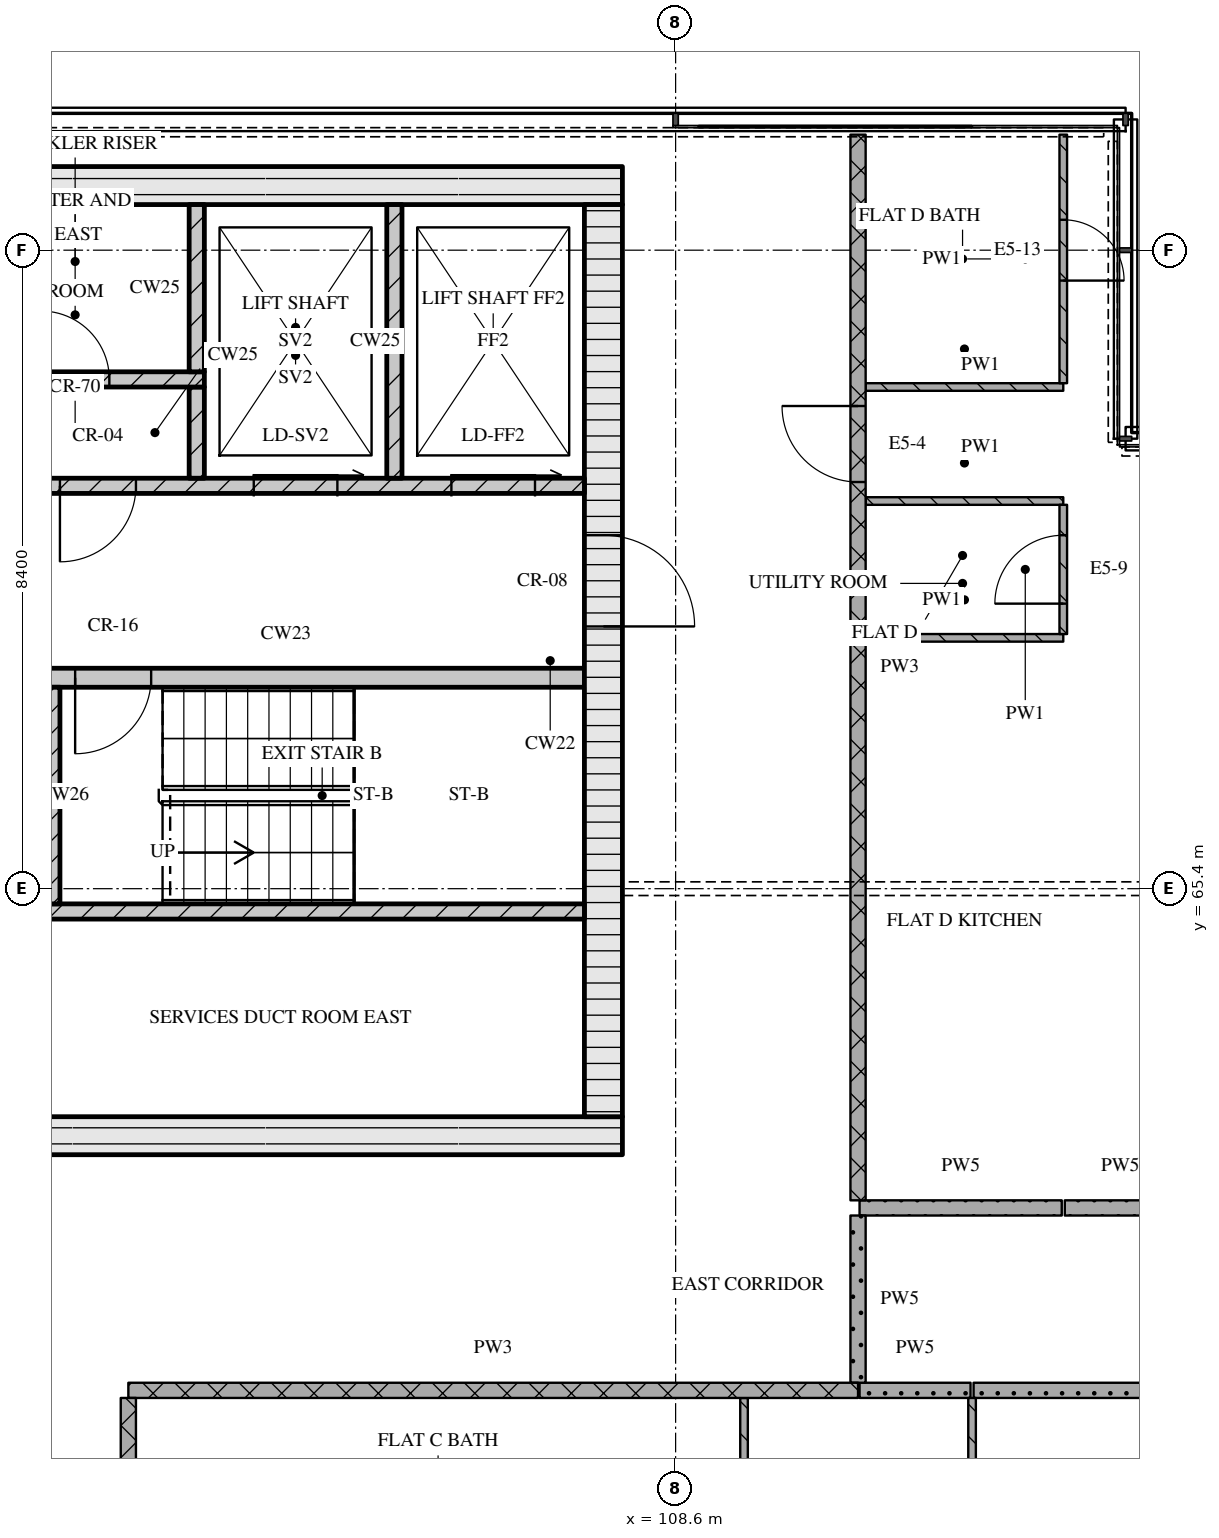
"""IFC4 building model, lengths in metres.
Left out: names, types, materials, properties, quantities, classifications, styles, units other than length and angle.
Written with IfcOpenShell. Run it as: python <this file> out.ifc"""

import sys

from ifc_helpers import new_model, si_unit, direction, frame, frame_2d, origin, place, context, subcontext, project, spatial, rectangle, extrude, element, fill, save


model = new_model("IFC4")
c1 = context("Model", 3, precision=1e-05, world=origin(), true_north=direction((0.0, 1.0)))
c2 = subcontext(c1, "Body", "Model", "MODEL_VIEW")
j1 = project(units=[si_unit("LENGTHUNIT", "METRE"), si_unit("PLANEANGLEUNIT", "RADIAN")], contexts=[c1])
p1 = place(None, origin())
s1 = spatial("IfcSite", under=j1, at=p1, CompositionType="ELEMENT")
p2 = place(p1, origin())
s2 = spatial("IfcBuilding", under=s1, at=p2, CompositionType="ELEMENT")
p3 = place(p2, frame((0.0, 0.0, 288.75)))
s3 = spatial("IfcBuildingStorey", under=s2, at=p3, CompositionType="ELEMENT", Elevation=288.75)
p4 = place(p3, frame((67.3, 62.15, 0.0), z_axis=(0.0, 0.0, 1.0), x_axis=(1.0, 0.0, 0.0)))
e1 = element("IfcWall", 1, at=p4, inside=s3, PredefinedType="SOLIDWALL", context=c2, shape_type="SweptSolid", body=[
    extrude(rectangle(XDim=40.6, YDim=0.5, at=frame_2d((20.3, 0.0))), origin(), (0.0, 0.0, 1.0), 3.32),
])
p5 = place(p4, frame((20.65, 0.0, 0.0)))
e2 = element("IfcOpeningElement", 2, at=p5, cuts=e1, PredefinedType="OPENING", context=c2, shape_type="SweptSolid", body=[
    extrude(rectangle(XDim=1.8, YDim=2.1, at=frame_2d((0.9, 1.05))), frame((0.0, 0.26, 0.0), z_axis=(0.0, -1.0, 0.0), x_axis=(1.0, 0.0, 0.0)), (0.0, 0.0, 1.0), 0.52),
])
p6 = place(p3, frame((67.3, 74.65, 0.0), z_axis=(0.0, 0.0, 1.0), x_axis=(1.0, 0.0, 0.0)))
e3 = element("IfcWall", 3, at=p6, inside=s3, PredefinedType="SOLIDWALL", context=c2, shape_type="SweptSolid", body=[
    extrude(rectangle(XDim=40.6, YDim=0.5, at=frame_2d((20.3, 0.0))), origin(), (0.0, 0.0, 1.0), 3.32),
])
p7 = place(p3, frame((107.65, 62.4, 0.0), z_axis=(0.0, 0.0, 1.0), x_axis=(0.0, 1.0, 0.0)))
e4 = element("IfcWall", 4, at=p7, inside=s3, PredefinedType="SOLIDWALL", context=c2, shape_type="SweptSolid", body=[
    extrude(rectangle(XDim=12.0, YDim=0.5, at=frame_2d((6.0, 0.0))), origin(), (0.0, 0.0, 1.0), 3.32),
])
p8 = place(p7, frame((6.45, 0.0, 0.0)))
e5 = element("IfcOpeningElement", 5, at=p8, cuts=e4, PredefinedType="OPENING", context=c2, shape_type="SweptSolid", body=[
    extrude(rectangle(XDim=1.2, YDim=2.1, at=frame_2d((0.6, 1.05))), frame((0.0, 0.26, 0.0), z_axis=(0.0, -1.0, 0.0), x_axis=(1.0, 0.0, 0.0)), (0.0, 0.0, 1.0), 0.52),
])
p9 = place(p3, frame((91.4, 65.1, 0.0), z_axis=(0.0, 0.0, 1.0), x_axis=(1.0, 0.0, 0.0)))
e6 = element("IfcWall", 6, at=p9, inside=s3, PredefinedType="SOLIDWALL", context=c2, shape_type="SweptSolid", body=[
    extrude(rectangle(XDim=16.0, YDim=0.2, at=frame_2d((8.0, 0.0))), origin(), (0.0, 0.0, 1.0), 3.32),
])
p10 = place(p9, frame((0.85, 0.0, 0.0)))
e7 = element("IfcOpeningElement", 7, at=p10, cuts=e6, PredefinedType="OPENING", context=c2, shape_type="SweptSolid", body=[
    extrude(rectangle(XDim=1.1, YDim=2.1, at=frame_2d((0.55, 1.05))), frame((0.0, 0.11, 0.0), z_axis=(0.0, -1.0, 0.0), x_axis=(1.0, 0.0, 0.0)), (0.0, 0.0, 1.0), 0.22),
])
p11 = place(p9, frame((3.35, 0.0, 0.0)))
e8 = element("IfcOpeningElement", 8, at=p11, cuts=e6, PredefinedType="OPENING", context=c2, shape_type="SweptSolid", body=[
    extrude(rectangle(XDim=1.1, YDim=2.1, at=frame_2d((0.55, 1.05))), frame((0.0, 0.11, 0.0), z_axis=(0.0, -1.0, 0.0), x_axis=(1.0, 0.0, 0.0)), (0.0, 0.0, 1.0), 0.22),
])
p12 = place(p9, frame((5.85, 0.0, 0.0)))
e9 = element("IfcOpeningElement", 9, at=p12, cuts=e6, PredefinedType="OPENING", context=c2, shape_type="SweptSolid", body=[
    extrude(rectangle(XDim=1.1, YDim=2.1, at=frame_2d((0.55, 1.05))), frame((0.0, 0.11, 0.0), z_axis=(0.0, -1.0, 0.0), x_axis=(1.0, 0.0, 0.0)), (0.0, 0.0, 1.0), 0.22),
])
p13 = place(p9, frame((7.83, 0.0, 0.0)))
e10 = element("IfcOpeningElement", 10, at=p13, cuts=e6, PredefinedType="OPENING", context=c2, shape_type="SweptSolid", body=[
    extrude(rectangle(XDim=0.9, YDim=2.1, at=frame_2d((0.45, 1.05))), frame((0.0, 0.11, 0.0), z_axis=(0.0, -1.0, 0.0), x_axis=(1.0, 0.0, 0.0)), (0.0, 0.0, 1.0), 0.22),
])
p14 = place(p3, frame((100.35, 65.2, 0.0), z_axis=(0.0, 0.0, 1.0), x_axis=(0.0, 1.0, 0.0)))
e11 = element("IfcWall", 11, at=p14, inside=s3, PredefinedType="SOLIDWALL", context=c2, shape_type="SweptSolid", body=[
    extrude(rectangle(XDim=2.85, YDim=0.3, at=frame_2d((1.425, 0.0))), origin(), (0.0, 0.0, 1.0), 3.32),
])
p15 = place(p3, frame((98.95, 68.175, 0.0), z_axis=(0.0, 0.0, 1.0), x_axis=(1.0, 0.0, 0.0)))
e12 = element("IfcWall", 12, at=p15, inside=s3, PredefinedType="SOLIDWALL", context=c2, shape_type="SweptSolid", body=[
    extrude(rectangle(XDim=8.45, YDim=0.25, at=frame_2d((4.225, 0.0))), origin(), (0.0, 0.0, 1.0), 3.32),
])
p16 = place(p15, frame((0.45, 0.0, 0.0)))
e13 = element("IfcOpeningElement", 13, at=p16, cuts=e12, PredefinedType="OPENING", context=c2, shape_type="SweptSolid", body=[
    extrude(rectangle(XDim=0.8, YDim=2.1, at=frame_2d((0.4, 1.05))), frame((0.0, 0.135, 0.0), z_axis=(0.0, -1.0, 0.0), x_axis=(1.0, 0.0, 0.0)), (0.0, 0.0, 1.0), 0.27),
])
p17 = place(p15, frame((1.75, 0.0, 0.0)))
e14 = element("IfcOpeningElement", 14, at=p17, cuts=e12, PredefinedType="OPENING", context=c2, shape_type="SweptSolid", body=[
    extrude(rectangle(XDim=1.0, YDim=2.1, at=frame_2d((0.5, 1.05))), frame((0.0, 0.135, 0.0), z_axis=(0.0, -1.0, 0.0), x_axis=(1.0, 0.0, 0.0)), (0.0, 0.0, 1.0), 0.27),
])
p18 = place(p3, frame((67.8, 70.7, 0.0), z_axis=(0.0, 0.0, 1.0), x_axis=(1.0, 0.0, 0.0)))
e15 = element("IfcWall", 15, at=p18, inside=s3, PredefinedType="SOLIDWALL", context=c2, shape_type="SweptSolid", body=[
    extrude(rectangle(XDim=39.6, YDim=0.2, at=frame_2d((19.8, 0.0))), origin(), (0.0, 0.0, 1.0), 3.32),
])
p19 = place(p18, frame((0.65, 0.0, 0.0)))
e16 = element("IfcOpeningElement", 16, at=p19, cuts=e15, PredefinedType="OPENING", context=c2, shape_type="SweptSolid", body=[
    extrude(rectangle(XDim=1.1, YDim=2.1, at=frame_2d((0.55, 1.05))), frame((0.0, 0.11, 0.0), z_axis=(0.0, -1.0, 0.0), x_axis=(1.0, 0.0, 0.0)), (0.0, 0.0, 1.0), 0.22),
])
p20 = place(p18, frame((3.25, 0.0, 0.0)))
e17 = element("IfcOpeningElement", 17, at=p20, cuts=e15, PredefinedType="OPENING", context=c2, shape_type="SweptSolid", body=[
    extrude(rectangle(XDim=1.1, YDim=2.1, at=frame_2d((0.55, 1.05))), frame((0.0, 0.11, 0.0), z_axis=(0.0, -1.0, 0.0), x_axis=(1.0, 0.0, 0.0)), (0.0, 0.0, 1.0), 0.22),
])
p21 = place(p18, frame((5.9, 0.0, 0.0)))
e18 = element("IfcOpeningElement", 18, at=p21, cuts=e15, PredefinedType="OPENING", context=c2, shape_type="SweptSolid", body=[
    extrude(rectangle(XDim=1.0, YDim=2.1, at=frame_2d((0.5, 1.05))), frame((0.0, 0.11, 0.0), z_axis=(0.0, -1.0, 0.0), x_axis=(1.0, 0.0, 0.0)), (0.0, 0.0, 1.0), 0.22),
])
p22 = place(p18, frame((21.7, 0.0, 0.0)))
e19 = element("IfcOpeningElement", 19, at=p22, cuts=e15, PredefinedType="OPENING", context=c2, shape_type="SweptSolid", body=[
    extrude(rectangle(XDim=1.0, YDim=2.1, at=frame_2d((0.5, 1.05))), frame((0.0, 0.11, 0.0), z_axis=(0.0, -1.0, 0.0), x_axis=(1.0, 0.0, 0.0)), (0.0, 0.0, 1.0), 0.22),
])
p23 = place(p18, frame((32.7, 0.0, 0.0)))
e20 = element("IfcOpeningElement", 20, at=p23, cuts=e15, PredefinedType="OPENING", context=c2, shape_type="SweptSolid", body=[
    extrude(rectangle(XDim=1.0, YDim=2.1, at=frame_2d((0.5, 1.05))), frame((0.0, 0.11, 0.0), z_axis=(0.0, -1.0, 0.0), x_axis=(1.0, 0.0, 0.0)), (0.0, 0.0, 1.0), 0.22),
])
p24 = place(p18, frame((35.25, 0.0, 0.0)))
e21 = element("IfcOpeningElement", 21, at=p24, cuts=e15, PredefinedType="OPENING", context=c2, shape_type="SweptSolid", body=[
    extrude(rectangle(XDim=1.1, YDim=2.1, at=frame_2d((0.55, 1.05))), frame((0.0, 0.11, 0.0), z_axis=(0.0, -1.0, 0.0), x_axis=(1.0, 0.0, 0.0)), (0.0, 0.0, 1.0), 0.22),
])
p25 = place(p18, frame((37.85, 0.0, 0.0)))
e22 = element("IfcOpeningElement", 22, at=p25, cuts=e15, PredefinedType="OPENING", context=c2, shape_type="SweptSolid", body=[
    extrude(rectangle(XDim=1.1, YDim=2.1, at=frame_2d((0.55, 1.05))), frame((0.0, 0.11, 0.0), z_axis=(0.0, -1.0, 0.0), x_axis=(1.0, 0.0, 0.0)), (0.0, 0.0, 1.0), 0.22),
])
p26 = place(p3, frame((102.3, 70.8, 0.0), z_axis=(0.0, 0.0, 1.0), x_axis=(0.0, 1.0, 0.0)))
e23 = element("IfcWall", 23, at=p26, inside=s3, PredefinedType="SOLIDWALL", context=c2, shape_type="SweptSolid", body=[
    extrude(rectangle(XDim=1.2, YDim=0.2, at=frame_2d((0.6, 0.0))), origin(), (0.0, 0.0, 1.0), 3.32),
])
p27 = place(p3, frame((104.9, 70.8, 0.0), z_axis=(0.0, 0.0, 1.0), x_axis=(0.0, 1.0, 0.0)))
e24 = element("IfcWall", 24, at=p27, inside=s3, PredefinedType="SOLIDWALL", context=c2, shape_type="SweptSolid", body=[
    extrude(rectangle(XDim=3.6, YDim=0.2, at=frame_2d((1.8, 0.0))), origin(), (0.0, 0.0, 1.0), 3.32),
])
p28 = place(p3, frame((96.68, 72.1, 0.0), z_axis=(0.0, 0.0, 1.0), x_axis=(1.0, 0.0, 0.0)))
e25 = element("IfcWall", 25, at=p28, inside=s3, PredefinedType="SOLIDWALL", context=c2, shape_type="SweptSolid", body=[
    extrude(rectangle(XDim=5.72, YDim=0.2, at=frame_2d((2.86, 0.0))), origin(), (0.0, 0.0, 1.0), 3.32),
])
p29 = place(p28, frame((0.77, 0.0, 0.0)))
e26 = element("IfcOpeningElement", 26, at=p29, cuts=e25, PredefinedType="OPENING", context=c2, shape_type="SweptSolid", body=[
    extrude(rectangle(XDim=0.9, YDim=2.1, at=frame_2d((0.45, 1.05))), frame((0.0, 0.11, 0.0), z_axis=(0.0, -1.0, 0.0), x_axis=(1.0, 0.0, 0.0)), (0.0, 0.0, 1.0), 0.22),
])
p30 = place(p28, frame((3.57, 0.0, 0.0)))
e27 = element("IfcOpeningElement", 27, at=p30, cuts=e25, PredefinedType="OPENING", context=c2, shape_type="SweptSolid", body=[
    extrude(rectangle(XDim=0.9, YDim=2.1, at=frame_2d((0.45, 1.05))), frame((0.0, 0.11, 0.0), z_axis=(0.0, -1.0, 0.0), x_axis=(1.0, 0.0, 0.0)), (0.0, 0.0, 1.0), 0.22),
])
p31 = place(p3, frame((102.3, 72.2, 0.0), z_axis=(0.0, 0.0, 1.0), x_axis=(0.0, 1.0, 0.0)))
e28 = element("IfcWall", 28, at=p31, inside=s3, PredefinedType="SOLIDWALL", context=c2, shape_type="SweptSolid", body=[
    extrude(rectangle(XDim=2.2, YDim=0.2, at=frame_2d((1.1, 0.0))), origin(), (0.0, 0.0, 1.0), 3.32),
])
p32 = place(p3, frame((101.4, 58.8, 0.0), z_axis=(0.0, 0.0, 1.0), x_axis=(1.0, 0.0, 0.0)))
e29 = element("IfcWall", 29, at=p32, inside=s3, PredefinedType="PARTITIONING", context=c2, shape_type="SweptSolid", body=[
    extrude(rectangle(XDim=9.6, YDim=0.2, at=frame_2d((4.8, 0.0))), origin(), (0.0, 0.0, 1.0), 3.32),
])
p33 = place(p3, frame((111.02, 58.8, 0.0), z_axis=(0.0, 0.0, 1.0), x_axis=(1.0, 0.0, 0.0)))
e30 = element("IfcWall", 30, at=p33, inside=s3, PredefinedType="PARTITIONING", context=c2, shape_type="SweptSolid", body=[
    extrude(rectangle(XDim=1.46, YDim=0.2, at=frame_2d((0.73, 0.0))), origin(), (0.0, 0.0, 1.0), 3.32),
])
p34 = place(p3, frame((112.52, 58.8, 0.0), z_axis=(0.0, 0.0, 1.0), x_axis=(1.0, 0.0, 0.0)))
e31 = element("IfcWall", 31, at=p34, inside=s3, PredefinedType="PARTITIONING", context=c2, shape_type="SweptSolid", body=[
    extrude(rectangle(XDim=5.98, YDim=0.2, at=frame_2d((2.99, 0.0))), origin(), (0.0, 0.0, 1.0), 3.32),
])
p35 = place(p3, frame((111.02, 61.2, 0.0), z_axis=(0.0, 0.0, 1.0), x_axis=(1.0, 0.0, 0.0)))
e32 = element("IfcWall", 32, at=p35, inside=s3, PredefinedType="PARTITIONING", context=c2, shape_type="SweptSolid", body=[
    extrude(rectangle(XDim=2.66, YDim=0.2, at=frame_2d((1.33, 0.0))), origin(), (0.0, 0.0, 1.0), 3.32),
])
p36 = place(p3, frame((113.72, 61.2, 0.0), z_axis=(0.0, 0.0, 1.0), x_axis=(1.0, 0.0, 0.0)))
e33 = element("IfcWall", 33, at=p36, inside=s3, PredefinedType="PARTITIONING", context=c2, shape_type="SweptSolid", body=[
    extrude(rectangle(XDim=1.46, YDim=0.2, at=frame_2d((0.73, 0.0))), origin(), (0.0, 0.0, 1.0), 3.32),
])
for number, where, z_axis, x_axis in (
    (34, (111.1, 68.7, 0.0), (0.0, 0.0, 1.0), (1.0, 0.0, 0.0)),
    (35, (111.1, 70.5, 0.0), (0.0, 0.0, 1.0), (1.0, 0.0, 0.0)),
    (36, (111.1, 72.0, 0.0), (0.0, 0.0, 1.0), (1.0, 0.0, 0.0)),
):
    element("IfcWall", number, at=place(p3, frame(where, z_axis=z_axis, x_axis=x_axis)), inside=s3, PredefinedType="PARTITIONING", context=c2, shape_type="SweptSolid", body=[
        extrude(rectangle(XDim=2.6, YDim=0.1, at=frame_2d((1.3, 0.0))), origin(), (0.0, 0.0, 1.0), 3.32),
    ])
p37 = place(p3, frame((101.4, 58.7, 0.0), z_axis=(0.0, 0.0, 1.0), x_axis=(0.0, -1.0, 0.0)))
e37 = element("IfcWall", 37, at=p37, inside=s3, PredefinedType="PARTITIONING", context=c2, shape_type="SweptSolid", body=[
    extrude(rectangle(XDim=8.0, YDim=0.2, at=frame_2d((4.0, 0.0))), origin(), (0.0, 0.0, 1.0), 3.32),
])
p38 = place(p37, frame((2.55, 0.0, 0.0)))
e38 = element("IfcOpeningElement", 38, at=p38, cuts=e37, PredefinedType="OPENING", context=c2, shape_type="SweptSolid", body=[
    extrude(rectangle(XDim=1.0, YDim=2.1, at=frame_2d((0.5, 1.05))), frame((0.0, 0.11, 0.0), z_axis=(0.0, -1.0, 0.0), x_axis=(1.0, 0.0, 0.0)), (0.0, 0.0, 1.0), 0.22),
])
p39 = place(p3, frame((109.5, 58.7, 0.0), z_axis=(0.0, 0.0, 1.0), x_axis=(0.0, -1.0, 0.0)))
e39 = element("IfcWall", 39, at=p39, inside=s3, PredefinedType="PARTITIONING", context=c2, shape_type="SweptSolid", body=[
    extrude(rectangle(XDim=2.25, YDim=0.1, at=frame_2d((1.125, 0.0))), origin(), (0.0, 0.0, 1.0), 3.32),
])
p40 = place(p3, frame((111.0, 75.32, 0.0), z_axis=(0.0, 0.0, 1.0), x_axis=(0.0, -1.0, 0.0)))
e40 = element("IfcWall", 40, at=p40, inside=s3, PredefinedType="PARTITIONING", context=c2, shape_type="SweptSolid", body=[
    extrude(rectangle(XDim=14.02, YDim=0.2, at=frame_2d((7.01, 0.0))), origin(), (0.0, 0.0, 1.0), 3.32),
])
p41 = place(p40, frame((3.57, 0.0, 0.0)))
e41 = element("IfcOpeningElement", 41, at=p41, cuts=e40, PredefinedType="OPENING", context=c2, shape_type="SweptSolid", body=[
    extrude(rectangle(XDim=1.0, YDim=2.1, at=frame_2d((0.5, 1.05))), frame((0.0, 0.11, 0.0), z_axis=(0.0, -1.0, 0.0), x_axis=(1.0, 0.0, 0.0)), (0.0, 0.0, 1.0), 0.22),
])
p42 = place(p3, frame((111.0, 61.1, 0.0), z_axis=(0.0, 0.0, 1.0), x_axis=(0.0, -1.0, 0.0)))
e42 = element("IfcWall", 42, at=p42, inside=s3, PredefinedType="PARTITIONING", context=c2, shape_type="SweptSolid", body=[
    extrude(rectangle(XDim=2.2, YDim=0.2, at=frame_2d((1.1, 0.0))), origin(), (0.0, 0.0, 1.0), 3.32),
])
p43 = place(p3, frame((112.5, 58.7, 0.0), z_axis=(0.0, 0.0, 1.0), x_axis=(0.0, -1.0, 0.0)))
e43 = element("IfcWall", 43, at=p43, inside=s3, PredefinedType="PARTITIONING", context=c2, shape_type="SweptSolid", body=[
    extrude(rectangle(XDim=3.0, YDim=0.1, at=frame_2d((1.5, 0.0))), origin(), (0.0, 0.0, 1.0), 3.32),
])
p44 = place(p43, frame((1.025, 0.0, 0.0)))
e44 = element("IfcOpeningElement", 44, at=p44, cuts=e43, PredefinedType="OPENING", context=c2, shape_type="SweptSolid", body=[
    extrude(rectangle(XDim=0.9, YDim=2.1, at=frame_2d((0.45, 1.05))), frame((0.0, 0.06, 0.0), z_axis=(0.0, -1.0, 0.0), x_axis=(1.0, 0.0, 0.0)), (0.0, 0.0, 1.0), 0.12),
])
p45 = place(p3, frame((113.7, 68.75, 0.0), z_axis=(0.0, 0.0, 1.0), x_axis=(0.0, 1.0, 0.0)))
e45 = element("IfcWall", 45, at=p45, inside=s3, PredefinedType="PARTITIONING", context=c2, shape_type="SweptSolid", body=[
    extrude(rectangle(XDim=1.7, YDim=0.1, at=frame_2d((0.85, 0.0))), origin(), (0.0, 0.0, 1.0), 3.32),
])
p46 = place(p45, frame((0.4, 0.0, 0.0)))
e46 = element("IfcOpeningElement", 46, at=p46, cuts=e45, PredefinedType="OPENING", context=c2, shape_type="SweptSolid", body=[
    extrude(rectangle(XDim=0.9, YDim=2.1, at=frame_2d((0.45, 1.05))), frame((0.0, 0.06, 0.0), z_axis=(0.0, -1.0, 0.0), x_axis=(1.0, 0.0, 0.0)), (0.0, 0.0, 1.0), 0.12),
])
p47 = place(p3, frame((113.7, 72.05, 0.0), z_axis=(0.0, 0.0, 1.0), x_axis=(0.0, 1.0, 0.0)))
e47 = element("IfcWall", 47, at=p47, inside=s3, PredefinedType="PARTITIONING", context=c2, shape_type="SweptSolid", body=[
    extrude(rectangle(XDim=3.27, YDim=0.1, at=frame_2d((1.635, 0.0))), origin(), (0.0, 0.0, 1.0), 3.32),
])
p48 = place(p47, frame((1.35, 0.0, 0.0)))
e48 = element("IfcOpeningElement", 48, at=p48, cuts=e47, PredefinedType="OPENING", context=c2, shape_type="SweptSolid", body=[
    extrude(rectangle(XDim=0.8, YDim=2.1, at=frame_2d((0.4, 1.05))), frame((0.0, 0.06, 0.0), z_axis=(0.0, -1.0, 0.0), x_axis=(1.0, 0.0, 0.0)), (0.0, 0.0, 1.0), 0.12),
])
p49 = place(p17, origin())
e49 = element("IfcDoor", 49, at=p49, inside=s3, OperationType="SINGLE_SWING_RIGHT", PredefinedType="DOOR", context=c2, shape_type="SweptSolid", body=[
    extrude(rectangle(XDim=1.0, YDim=2.1, at=frame_2d((0.5, 1.05))), frame((0.0, 0.025, 0.0), z_axis=(0.0, -1.0, 0.0), x_axis=(1.0, 0.0, 0.0)), (0.0, 0.0, 1.0), 0.05),
])
fill(e14, e49)
p50 = place(p8, origin())
e50 = element("IfcDoor", 50, at=p50, inside=s3, OperationType="SINGLE_SWING_RIGHT", PredefinedType="DOOR", context=c2, shape_type="SweptSolid", body=[
    extrude(rectangle(XDim=1.2, YDim=2.1, at=frame_2d((0.6, 1.05))), frame((0.0, 0.025, 0.0), z_axis=(0.0, -1.0, 0.0), x_axis=(1.0, 0.0, 0.0)), (0.0, 0.0, 1.0), 0.05),
])
fill(e5, e50)
p51 = place(p23, origin())
e51 = element("IfcDoor", 51, at=p51, inside=s3, OperationType="SINGLE_SWING_RIGHT", PredefinedType="DOOR", context=c2, shape_type="SweptSolid", body=[
    extrude(rectangle(XDim=1.0, YDim=2.1, at=frame_2d((0.5, 1.05))), frame((0.0, 0.025, 0.0), z_axis=(0.0, -1.0, 0.0), x_axis=(1.0, 0.0, 0.0)), (0.0, 0.0, 1.0), 0.05),
])
fill(e20, e51)
p52 = place(p24, origin())
e52 = element("IfcDoor", 52, at=p52, inside=s3, OperationType="SLIDING_TO_RIGHT", PredefinedType="DOOR", context=c2, shape_type="SweptSolid", body=[
    extrude(rectangle(XDim=1.1, YDim=2.1, at=frame_2d((0.55, 1.05))), frame((0.0, 0.025, 0.0), z_axis=(0.0, -1.0, 0.0), x_axis=(1.0, 0.0, 0.0)), (0.0, 0.0, 1.0), 0.05),
])
fill(e21, e52)
p53 = place(p25, origin())
e53 = element("IfcDoor", 53, at=p53, inside=s3, OperationType="SLIDING_TO_RIGHT", PredefinedType="DOOR", context=c2, shape_type="SweptSolid", body=[
    extrude(rectangle(XDim=1.1, YDim=2.1, at=frame_2d((0.55, 1.05))), frame((0.0, 0.025, 0.0), z_axis=(0.0, -1.0, 0.0), x_axis=(1.0, 0.0, 0.0)), (0.0, 0.0, 1.0), 0.05),
])
fill(e22, e53)
p54 = place(p30, origin())
e54 = element("IfcDoor", 54, at=p54, inside=s3, OperationType="SINGLE_SWING_LEFT", PredefinedType="DOOR", context=c2, shape_type="SweptSolid", body=[
    extrude(rectangle(XDim=0.9, YDim=2.1, at=frame_2d((0.45, 1.05))), frame((0.0, 0.025, 0.0), z_axis=(0.0, -1.0, 0.0), x_axis=(1.0, 0.0, 0.0)), (0.0, 0.0, 1.0), 0.05),
])
fill(e27, e54)
p55 = place(p41, origin())
e55 = element("IfcDoor", 55, at=p55, inside=s3, OperationType="SINGLE_SWING_RIGHT", PredefinedType="DOOR", context=c2, shape_type="SweptSolid", body=[
    extrude(rectangle(XDim=1.0, YDim=2.1, at=frame_2d((0.5, 1.05))), frame((0.0, 0.025, 0.0), z_axis=(0.0, -1.0, 0.0), x_axis=(1.0, 0.0, 0.0)), (0.0, 0.0, 1.0), 0.05),
])
fill(e41, e55)
p56 = place(p46, origin())
e56 = element("IfcDoor", 56, at=p56, inside=s3, OperationType="SINGLE_SWING_LEFT", PredefinedType="DOOR", context=c2, shape_type="SweptSolid", body=[
    extrude(rectangle(XDim=0.9, YDim=2.1, at=frame_2d((0.45, 1.05))), frame((0.0, 0.025, 0.0), z_axis=(0.0, -1.0, 0.0), x_axis=(1.0, 0.0, 0.0)), (0.0, 0.0, 1.0), 0.05),
])
fill(e46, e56)
p57 = place(p48, origin())
e57 = element("IfcDoor", 57, at=p57, inside=s3, OperationType="SINGLE_SWING_RIGHT", PredefinedType="DOOR", context=c2, shape_type="SweptSolid", body=[
    extrude(rectangle(XDim=0.8, YDim=2.1, at=frame_2d((0.4, 1.05))), frame((0.0, 0.025, 0.0), z_axis=(0.0, -1.0, 0.0), x_axis=(1.0, 0.0, 0.0)), (0.0, 0.0, 1.0), 0.05),
])
fill(e48, e57)
save(model, sys.argv[1])
